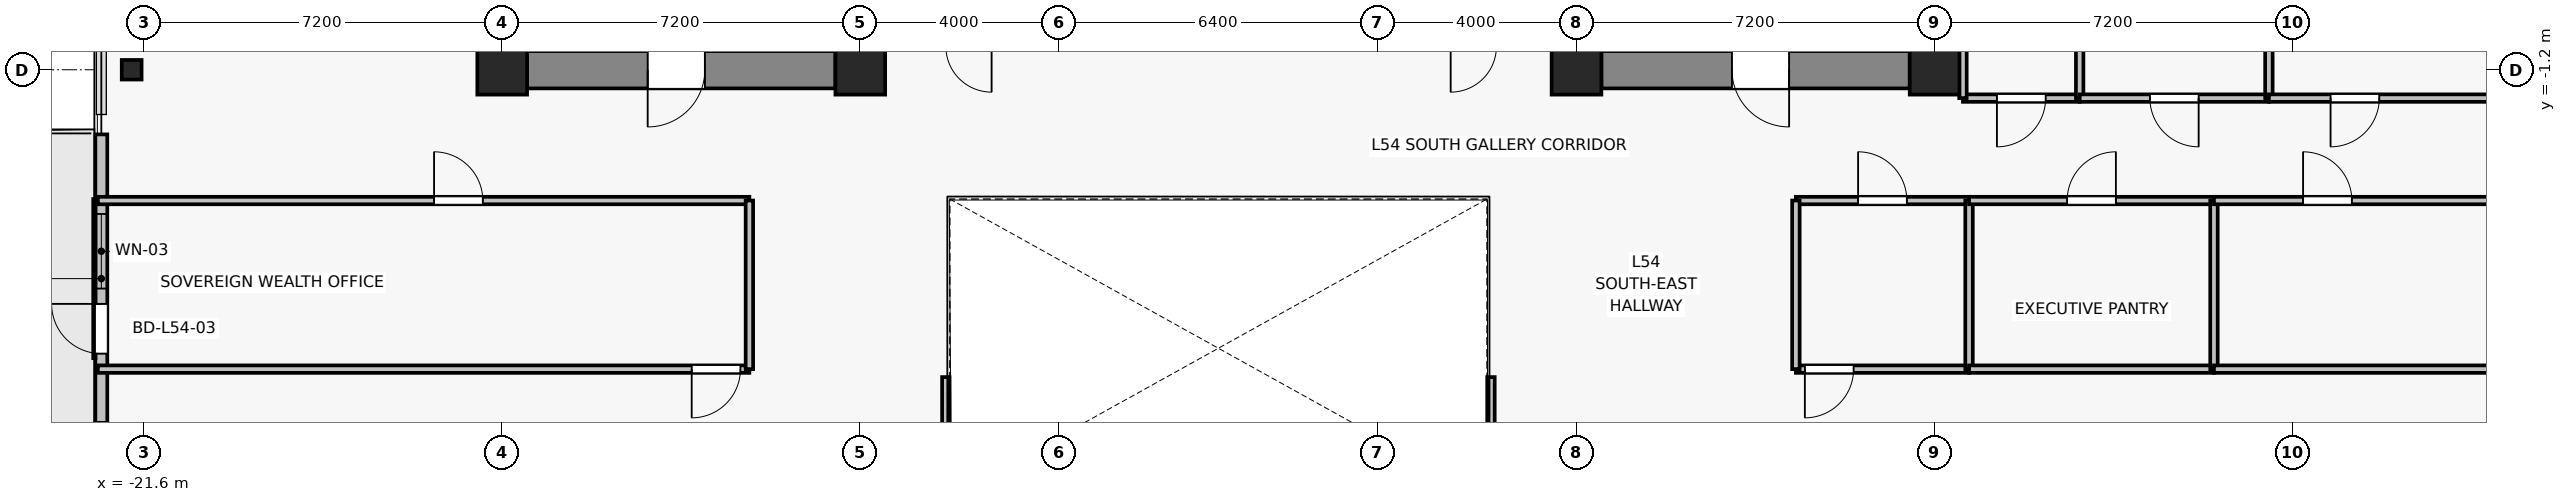
"""IFC4 building model, lengths in metres.
Left out: names, types, materials, properties, quantities, classifications, styles, units other than length and angle.
Written with IfcOpenShell. Run it as: python <this file> out.ifc"""

import sys

from ifc_helpers import new_model, si_unit, direction, frame, frame_2d, origin, origin_2d, place, context, subcontext, project, spatial, rectangle, i_section, extrude, source, transform, mapped, element, fill, save


model = new_model("IFC4")
c1 = context("Model", 3, precision=1e-05, world=origin(), true_north=direction((0.0, 1.0)))
c2 = subcontext(c1, "Body", "Model", "MODEL_VIEW")
j1 = project(units=[si_unit("LENGTHUNIT", "METRE"), si_unit("PLANEANGLEUNIT", "RADIAN")], contexts=[c1])
p1 = place(None, origin())
s1 = spatial("IfcSite", under=j1, at=p1, CompositionType="ELEMENT")
p2 = place(p1, origin())
s2 = spatial("IfcBuilding", under=s1, at=p2, CompositionType="ELEMENT")
p3 = place(p2, frame((0.0, 0.0, 192.4)))
s3 = spatial("IfcBuildingStorey", under=s2, at=p3, CompositionType="ELEMENT", Elevation=192.4)
for number, where, z_axis, x_axis in (
    (1, (-14.4, -1.2, 0.0), (0.0, 0.0, 1.0), (1.0, 0.0, 0.0)),
    (2, (-7.2, -1.2, 0.0), (0.0, 0.0, 1.0), (1.0, 0.0, 0.0)),
    (3, (7.2, -1.2, 0.0), (0.0, 0.0, 1.0), (1.0, 0.0, 0.0)),
    (4, (14.4, -1.2, 0.0), (0.0, 0.0, 1.0), (1.0, 0.0, 0.0)),
):
    element("IfcColumn", number, at=place(p3, frame(where, z_axis=z_axis, x_axis=x_axis)), inside=s3, PredefinedType="COLUMN", context=c2, shape_type="SweptSolid", body=[
        extrude(rectangle(XDim=1.0, YDim=1.0, at=origin_2d()), origin(), (0.0, 0.0, 1.0), 3.3),
    ])
p4 = place(p3, frame((-21.85, -1.2, 0.0), z_axis=(0.0, 0.0, 1.0), x_axis=(1.0, 0.0, 0.0)))
e5 = element("IfcColumn", 5, at=p4, inside=s3, PredefinedType="COLUMN", context=c2, shape_type="SweptSolid", body=[
    extrude(i_section(OverallWidth=0.399, OverallDepth=0.394, WebThickness=0.023, FlangeThickness=0.037, FilletRadius=0.015, at=origin_2d()), origin(), (0.0, 0.0, 1.0), 3.3),
])
p5 = place(p3, frame((-7.7, -1.2, 0.0), z_axis=(0.0, 0.0, 1.0), x_axis=(-1.0, 0.0, 0.0)))
e6 = element("IfcWall", 6, at=p5, inside=s3, PredefinedType="SHEAR", context=c2, shape_type="SweptSolid", body=[
    extrude(rectangle(XDim=6.2, YDim=0.75, at=frame_2d((3.1, 0.0))), origin(), (0.0, 0.0, 1.0), 3.075),
])
p6 = place(p5, frame((2.625, 0.0, 0.0)))
e7 = element("IfcOpeningElement", 7, at=p6, cuts=e6, PredefinedType="OPENING", context=c2, shape_type="SweptSolid", body=[
    extrude(rectangle(XDim=1.15, YDim=2.15, at=frame_2d((0.575, 1.075))), frame((0.0, 0.385, 0.0), z_axis=(0.0, -1.0, 0.0), x_axis=(1.0, 0.0, 0.0)), (0.0, 0.0, 1.0), 0.77),
])
p7 = place(p3, frame((13.9, -1.2, 0.0), z_axis=(0.0, 0.0, 1.0), x_axis=(-1.0, 0.0, 0.0)))
e8 = element("IfcWall", 8, at=p7, inside=s3, PredefinedType="SHEAR", context=c2, shape_type="SweptSolid", body=[
    extrude(rectangle(XDim=6.2, YDim=0.75, at=frame_2d((3.1, 0.0))), origin(), (0.0, 0.0, 1.0), 3.075),
])
p8 = place(p7, frame((2.425, 0.0, 0.0)))
e9 = element("IfcOpeningElement", 9, at=p8, cuts=e8, PredefinedType="OPENING", context=c2, shape_type="SweptSolid", body=[
    extrude(rectangle(XDim=1.15, YDim=2.15, at=frame_2d((0.575, 1.075))), frame((0.0, 0.385, 0.0), z_axis=(0.0, -1.0, 0.0), x_axis=(1.0, 0.0, 0.0)), (0.0, 0.0, 1.0), 0.77),
])
p9 = place(p3, frame((-22.46, -8.3, 0.0), z_axis=(0.0, 0.0, 1.0), x_axis=(0.0, 1.0, 0.0)))
e10 = element("IfcWall", 10, at=p9, inside=s3, PredefinedType="SOLIDWALL", context=c2, shape_type="SweptSolid", body=[
    extrude(rectangle(XDim=5.8, YDim=0.24, at=frame_2d((2.9, 0.0))), origin(), (0.0, 0.0, 1.0), 3.075),
])
p10 = place(p9, frame((1.392, 0.0, 0.0)))
e11 = element("IfcOpeningElement", 11, at=p10, cuts=e10, PredefinedType="OPENING", context=c2, shape_type="SweptSolid", body=[
    extrude(rectangle(XDim=1.0, YDim=2.2, at=frame_2d((0.5, 1.1))), frame((0.0, 0.13, 0.0), z_axis=(0.0, -1.0, 0.0), x_axis=(1.0, 0.0, 0.0)), (0.0, 0.0, 1.0), 0.26),
])
p11 = place(p9, frame((2.7, 0.0, 0.85)))
e12 = element("IfcOpeningElement", 12, at=p11, cuts=e10, PredefinedType="OPENING", context=c2, shape_type="SweptSolid", body=[
    extrude(rectangle(XDim=1.5, YDim=1.6, at=frame_2d((0.75, 0.8))), frame((0.0, 0.13, 0.0), z_axis=(0.0, -1.0, 0.0), x_axis=(1.0, 0.0, 0.0)), (0.0, 0.0, 1.0), 0.26),
])
p12 = place(p3, frame((-9.43, -7.22, 0.0), z_axis=(0.0, 0.0, 1.0), x_axis=(-1.0, 0.0, 0.0)))
e13 = element("IfcWall", 13, at=p12, inside=s3, PredefinedType="PARTITIONING", context=c2, shape_type="SweptSolid", body=[
    extrude(rectangle(XDim=13.1, YDim=0.15, at=frame_2d((6.55, 0.0))), origin(), (0.0, 0.0, 1.0), 2.565),
])
p13 = place(p12, frame((0.18, 0.0, 0.0)))
e14 = element("IfcOpeningElement", 14, at=p13, cuts=e13, PredefinedType="OPENING", context=c2, shape_type="SweptSolid", body=[
    extrude(rectangle(XDim=0.98, YDim=2.15, at=frame_2d((0.49, 1.075))), frame((0.0, 0.085, 0.0), z_axis=(0.0, -1.0, 0.0), x_axis=(1.0, 0.0, 0.0)), (0.0, 0.0, 1.0), 0.17),
])
p14 = place(p3, frame((-22.53, -3.83, 0.0), z_axis=(0.0, 0.0, 1.0), x_axis=(1.0, 0.0, 0.0)))
e15 = element("IfcWall", 15, at=p14, inside=s3, PredefinedType="PARTITIONING", context=c2, shape_type="SweptSolid", body=[
    extrude(rectangle(XDim=13.1, YDim=0.15, at=frame_2d((6.55, 0.0))), origin(), (0.0, 0.0, 1.0), 2.565),
])
p15 = place(p14, frame((6.76, 0.0, 0.0)))
e16 = element("IfcOpeningElement", 16, at=p15, cuts=e15, PredefinedType="OPENING", context=c2, shape_type="SweptSolid", body=[
    extrude(rectangle(XDim=0.98, YDim=2.15, at=frame_2d((0.49, 1.075))), frame((0.0, 0.085, 0.0), z_axis=(0.0, -1.0, 0.0), x_axis=(1.0, 0.0, 0.0)), (0.0, 0.0, 1.0), 0.17),
])
p16 = place(p3, frame((-9.43, -3.83, 0.0), z_axis=(0.0, 0.0, 1.0), x_axis=(0.0, -1.0, 0.0)))
e17 = element("IfcWall", 17, at=p16, inside=s3, PredefinedType="PARTITIONING", context=c2, shape_type="SweptSolid", body=[
    extrude(rectangle(XDim=3.39, YDim=0.15, at=frame_2d((1.695, 0.0))), origin(), (0.0, 0.0, 1.0), 2.665),
])
p17 = place(p3, frame((-5.48, -7.38, 0.0), z_axis=(0.0, 0.0, 1.0), x_axis=(0.0, -1.0, 0.0)))
e18 = element("IfcWall", 18, at=p17, inside=s3, PredefinedType="PARTITIONING", context=c2, shape_type="SweptSolid", body=[
    extrude(rectangle(XDim=9.95, YDim=0.15, at=frame_2d((4.975, 0.0))), origin(), (0.0, 0.0, 1.0), 2.565),
])
p18 = place(p3, frame((15.092, -7.22, 0.0), z_axis=(0.0, 0.0, 1.0), x_axis=(-1.0, 0.0, 0.0)))
e19 = element("IfcWall", 19, at=p18, inside=s3, PredefinedType="PARTITIONING", context=c2, shape_type="SweptSolid", body=[
    extrude(rectangle(XDim=3.481, YDim=0.15, at=frame_2d((1.74, 0.0))), origin(), (0.0, 0.0, 1.0), 2.565),
])
p19 = place(p18, frame((2.321, 0.0, 0.0)))
e20 = element("IfcOpeningElement", 20, at=p19, cuts=e19, PredefinedType="OPENING", context=c2, shape_type="SweptSolid", body=[
    extrude(rectangle(XDim=0.98, YDim=2.15, at=frame_2d((0.49, 1.075))), frame((0.0, 0.085, 0.0), z_axis=(0.0, -1.0, 0.0), x_axis=(1.0, 0.0, 0.0)), (0.0, 0.0, 1.0), 0.17),
])
p20 = place(p3, frame((11.611, -3.83, 0.0), z_axis=(0.0, 0.0, 1.0), x_axis=(1.0, 0.0, 0.0)))
e21 = element("IfcWall", 21, at=p20, inside=s3, PredefinedType="PARTITIONING", context=c2, shape_type="SweptSolid", body=[
    extrude(rectangle(XDim=3.481, YDim=0.15, at=frame_2d((1.74, 0.0))), origin(), (0.0, 0.0, 1.0), 2.565),
])
p21 = place(p20, frame((1.25, 0.0, 0.0)))
e22 = element("IfcOpeningElement", 22, at=p21, cuts=e21, PredefinedType="OPENING", context=c2, shape_type="SweptSolid", body=[
    extrude(rectangle(XDim=0.98, YDim=2.15, at=frame_2d((0.49, 1.075))), frame((0.0, 0.085, 0.0), z_axis=(0.0, -1.0, 0.0), x_axis=(1.0, 0.0, 0.0)), (0.0, 0.0, 1.0), 0.17),
])
p22 = place(p3, frame((11.611, -7.22, 0.0), z_axis=(0.0, 0.0, 1.0), x_axis=(0.0, 1.0, 0.0)))
e23 = element("IfcWall", 23, at=p22, inside=s3, PredefinedType="PARTITIONING", context=c2, shape_type="SweptSolid", body=[
    extrude(rectangle(XDim=3.39, YDim=0.15, at=frame_2d((1.695, 0.0))), origin(), (0.0, 0.0, 1.0), 2.665),
])
p23 = place(p3, frame((15.092, -3.83, 0.0), z_axis=(0.0, 0.0, 1.0), x_axis=(0.0, -1.0, 0.0)))
e24 = element("IfcWall", 24, at=p23, inside=s3, PredefinedType="PARTITIONING", context=c2, shape_type="SweptSolid", body=[
    extrude(rectangle(XDim=3.39, YDim=0.15, at=frame_2d((1.695, 0.0))), origin(), (0.0, 0.0, 1.0), 3.075),
])
p24 = place(p3, frame((20.017, -7.22, 0.0), z_axis=(0.0, 0.0, 1.0), x_axis=(-1.0, 0.0, 0.0)))
e25 = element("IfcWall", 25, at=p24, inside=s3, PredefinedType="PARTITIONING", context=c2, shape_type="SweptSolid", body=[
    extrude(rectangle(XDim=4.925, YDim=0.15, at=frame_2d((2.462, 0.0))), origin(), (0.0, 0.0, 1.0), 3.075),
])
p25 = place(p3, frame((15.092, -3.83, 0.0), z_axis=(0.0, 0.0, 1.0), x_axis=(1.0, 0.0, 0.0)))
e26 = element("IfcWall", 26, at=p25, inside=s3, PredefinedType="PARTITIONING", context=c2, shape_type="SweptSolid", body=[
    extrude(rectangle(XDim=4.925, YDim=0.15, at=frame_2d((2.462, 0.0))), origin(), (0.0, 0.0, 1.0), 3.075),
])
p26 = place(p25, frame((1.973, 0.0, 0.0)))
e27 = element("IfcOpeningElement", 27, at=p26, cuts=e26, PredefinedType="OPENING", context=c2, shape_type="SweptSolid", body=[
    extrude(rectangle(XDim=0.98, YDim=2.15, at=frame_2d((0.49, 1.075))), frame((0.0, 0.085, 0.0), z_axis=(0.0, -1.0, 0.0), x_axis=(1.0, 0.0, 0.0)), (0.0, 0.0, 1.0), 0.17),
])
p27 = place(p3, frame((20.017, -3.83, 0.0), z_axis=(0.0, 0.0, 1.0), x_axis=(0.0, -1.0, 0.0)))
e28 = element("IfcWall", 28, at=p27, inside=s3, PredefinedType="PARTITIONING", context=c2, shape_type="SweptSolid", body=[
    extrude(rectangle(XDim=3.39, YDim=0.15, at=frame_2d((1.695, 0.0))), origin(), (0.0, 0.0, 1.0), 3.075),
])
p28 = place(p3, frame((26.53, -7.22, 0.0), z_axis=(0.0, 0.0, 1.0), x_axis=(-1.0, 0.0, 0.0)))
e29 = element("IfcWall", 29, at=p28, inside=s3, PredefinedType="PARTITIONING", context=c2, shape_type="SweptSolid", body=[
    extrude(rectangle(XDim=6.513, YDim=0.15, at=frame_2d((3.256, 0.0))), origin(), (0.0, 0.0, 1.0), 2.565),
])
p29 = place(p3, frame((20.017, -3.83, 0.0), z_axis=(0.0, 0.0, 1.0), x_axis=(1.0, 0.0, 0.0)))
e30 = element("IfcWall", 30, at=p29, inside=s3, PredefinedType="PARTITIONING", context=c2, shape_type="SweptSolid", body=[
    extrude(rectangle(XDim=6.513, YDim=0.15, at=frame_2d((3.256, 0.0))), origin(), (0.0, 0.0, 1.0), 2.565),
])
p30 = place(p29, frame((1.792, 0.0, 0.0)))
e31 = element("IfcOpeningElement", 31, at=p30, cuts=e30, PredefinedType="OPENING", context=c2, shape_type="SweptSolid", body=[
    extrude(rectangle(XDim=0.98, YDim=2.15, at=frame_2d((0.49, 1.075))), frame((0.0, 0.085, 0.0), z_axis=(0.0, -1.0, 0.0), x_axis=(1.0, 0.0, 0.0)), (0.0, 0.0, 1.0), 0.17),
])
p31 = place(p3, frame((5.48, -17.33, 0.0), z_axis=(0.0, 0.0, 1.0), x_axis=(0.0, 1.0, 0.0)))
e32 = element("IfcWall", 32, at=p31, inside=s3, PredefinedType="PARTITIONING", context=c2, shape_type="SweptSolid", body=[
    extrude(rectangle(XDim=9.95, YDim=0.15, at=frame_2d((4.975, 0.0))), origin(), (0.0, 0.0, 1.0), 2.565),
])
p32 = place(p3, frame((17.317, -1.77, 0.0), z_axis=(0.0, 0.0, 1.0), x_axis=(-1.0, 0.0, 0.0)))
e33 = element("IfcWall", 33, at=p32, inside=s3, PredefinedType="PARTITIONING", context=c2, shape_type="SweptSolid", body=[
    extrude(rectangle(XDim=2.347, YDim=0.15, at=frame_2d((1.173, 0.0))), origin(), (0.0, 0.0, 1.0), 3.075),
])
p33 = place(p32, frame((0.684, 0.0, 0.0)))
e34 = element("IfcOpeningElement", 34, at=p33, cuts=e33, PredefinedType="OPENING", context=c2, shape_type="SweptSolid", body=[
    extrude(rectangle(XDim=0.98, YDim=2.15, at=frame_2d((0.49, 1.075))), frame((0.0, 0.085, 0.0), z_axis=(0.0, -1.0, 0.0), x_axis=(1.0, 0.0, 0.0)), (0.0, 0.0, 1.0), 0.17),
])
p34 = place(p3, frame((14.97, -1.77, 0.0), z_axis=(0.0, 0.0, 1.0), x_axis=(0.0, 1.0, 0.0)))
e35 = element("IfcWall", 35, at=p34, inside=s3, PredefinedType="PARTITIONING", context=c2, shape_type="SweptSolid", body=[
    extrude(rectangle(XDim=1.07, YDim=0.15, at=frame_2d((0.535, 0.0))), origin(), (0.0, 0.0, 1.0), 2.565),
])
p35 = place(p3, frame((17.317, 13.88, 0.0), z_axis=(0.0, 0.0, 1.0), x_axis=(0.0, -1.0, 0.0)))
e36 = element("IfcWall", 36, at=p35, inside=s3, PredefinedType="PARTITIONING", context=c2, shape_type="SweptSolid", body=[
    extrude(rectangle(XDim=15.65, YDim=0.15, at=frame_2d((7.825, 0.0))), origin(), (0.0, 0.0, 1.0), 2.565),
])
p36 = place(p3, frame((21.122, -1.77, 0.0), z_axis=(0.0, 0.0, 1.0), x_axis=(-1.0, 0.0, 0.0)))
e37 = element("IfcWall", 37, at=p36, inside=s3, PredefinedType="PARTITIONING", context=c2, shape_type="SweptSolid", body=[
    extrude(rectangle(XDim=3.805, YDim=0.15, at=frame_2d((1.902, 0.0))), origin(), (0.0, 0.0, 1.0), 3.075),
])
p37 = place(p36, frame((1.413, 0.0, 0.0)))
e38 = element("IfcOpeningElement", 38, at=p37, cuts=e37, PredefinedType="OPENING", context=c2, shape_type="SweptSolid", body=[
    extrude(rectangle(XDim=0.98, YDim=2.15, at=frame_2d((0.49, 1.075))), frame((0.0, 0.085, 0.0), z_axis=(0.0, -1.0, 0.0), x_axis=(1.0, 0.0, 0.0)), (0.0, 0.0, 1.0), 0.17),
])
p38 = place(p3, frame((21.122, 13.88, 0.0), z_axis=(0.0, 0.0, 1.0), x_axis=(0.0, -1.0, 0.0)))
e39 = element("IfcWall", 39, at=p38, inside=s3, PredefinedType="PARTITIONING", context=c2, shape_type="SweptSolid", body=[
    extrude(rectangle(XDim=15.65, YDim=0.15, at=frame_2d((7.825, 0.0))), origin(), (0.0, 0.0, 1.0), 2.565),
])
p39 = place(p3, frame((26.53, -1.77, 0.0), z_axis=(0.0, 0.0, 1.0), x_axis=(-1.0, 0.0, 0.0)))
e40 = element("IfcWall", 40, at=p39, inside=s3, PredefinedType="PARTITIONING", context=c2, shape_type="SweptSolid", body=[
    extrude(rectangle(XDim=5.408, YDim=0.15, at=frame_2d((2.704, 0.0))), origin(), (0.0, 0.0, 1.0), 2.565),
])
p40 = place(p39, frame((3.189, 0.0, 0.0)))
e41 = element("IfcOpeningElement", 41, at=p40, cuts=e40, PredefinedType="OPENING", context=c2, shape_type="SweptSolid", body=[
    extrude(rectangle(XDim=0.98, YDim=2.15, at=frame_2d((0.49, 1.075))), frame((0.0, 0.085, 0.0), z_axis=(0.0, -1.0, 0.0), x_axis=(1.0, 0.0, 0.0)), (0.0, 0.0, 1.0), 0.17),
])
m1 = source(origin(), c2, "Body", "SweptSolid", [
    extrude(rectangle(XDim=1.0, YDim=2.2, at=frame_2d((0.5, 1.1))), frame((0.0, 0.025, 0.0), z_axis=(0.0, -1.0, 0.0), x_axis=(1.0, 0.0, 0.0)), (0.0, 0.0, 1.0), 0.05),
])
p41 = place(p10, origin())
e42 = element("IfcDoor", 42, at=p41, inside=s3, OperationType="SINGLE_SWING_RIGHT", PredefinedType="DOOR", context=c2, shape_type="MappedRepresentation", body=[
    mapped(m1, transform((0.0, 0.0, 0.0), x_axis=(1.0, 0.0, 0.0), y_axis=(0.0, 1.0, 0.0), z_axis=(0.0, 0.0, 1.0), scale=1.0)),
])
fill(e11, e42)
m2 = source(origin(), c2, "Body", "SweptSolid", [
    extrude(rectangle(XDim=1.5, YDim=1.6, at=frame_2d((0.75, 0.8))), frame((0.0, 0.03, 0.0), z_axis=(0.0, -1.0, 0.0), x_axis=(1.0, 0.0, 0.0)), (0.0, 0.0, 1.0), 0.06),
])
p42 = place(p11, origin())
e43 = element("IfcWindow", 43, at=p42, inside=s3, PartitioningType="SINGLE_PANEL", PredefinedType="WINDOW", context=c2, shape_type="MappedRepresentation", body=[
    mapped(m2, transform((0.0, 0.0, 0.0), x_axis=(1.0, 0.0, 0.0), y_axis=(0.0, 1.0, 0.0), z_axis=(0.0, 0.0, 1.0), scale=1.0)),
])
fill(e12, e43)
m3 = source(origin(), c2, "Body", "SweptSolid", [
    extrude(rectangle(XDim=1.15, YDim=2.15, at=frame_2d((0.575, 1.075))), frame((0.0, 0.025, 0.0), z_axis=(0.0, -1.0, 0.0), x_axis=(1.0, 0.0, 0.0)), (0.0, 0.0, 1.0), 0.05),
])
p43 = place(p6, origin())
e44 = element("IfcDoor", 44, at=p43, inside=s3, OperationType="SINGLE_SWING_RIGHT", PredefinedType="DOOR", context=c2, shape_type="MappedRepresentation", body=[
    mapped(m3, transform((0.0, 0.0, 0.0), x_axis=(1.0, 0.0, 0.0), y_axis=(0.0, 1.0, 0.0), z_axis=(0.0, 0.0, 1.0), scale=1.0)),
])
fill(e7, e44)
p44 = place(p8, origin())
e45 = element("IfcDoor", 45, at=p44, inside=s3, OperationType="SINGLE_SWING_LEFT", PredefinedType="DOOR", context=c2, shape_type="MappedRepresentation", body=[
    mapped(m3, transform((0.0, 0.0, 0.0), x_axis=(1.0, 0.0, 0.0), y_axis=(0.0, 1.0, 0.0), z_axis=(0.0, 0.0, 1.0), scale=1.0)),
])
fill(e9, e45)
m4 = source(origin(), c2, "Body", "SweptSolid", [
    extrude(rectangle(XDim=0.98, YDim=2.15, at=frame_2d((0.49, 1.075))), frame((0.0, 0.025, 0.0), z_axis=(0.0, -1.0, 0.0), x_axis=(1.0, 0.0, 0.0)), (0.0, 0.0, 1.0), 0.05),
])
p45 = place(p15, origin())
e46 = element("IfcDoor", 46, at=p45, inside=s3, OperationType="SINGLE_SWING_LEFT", PredefinedType="DOOR", context=c2, shape_type="MappedRepresentation", body=[
    mapped(m4, transform((0.0, 0.0, 0.0), x_axis=(1.0, 0.0, 0.0), y_axis=(0.0, 1.0, 0.0), z_axis=(0.0, 0.0, 1.0), scale=1.0)),
])
fill(e16, e46)
p46 = place(p13, origin())
e47 = element("IfcDoor", 47, at=p46, inside=s3, OperationType="SINGLE_SWING_RIGHT", PredefinedType="DOOR", context=c2, shape_type="MappedRepresentation", body=[
    mapped(m4, transform((0.0, 0.0, 0.0), x_axis=(1.0, 0.0, 0.0), y_axis=(0.0, 1.0, 0.0), z_axis=(0.0, 0.0, 1.0), scale=1.0)),
])
fill(e14, e47)
p47 = place(p21, origin())
e48 = element("IfcDoor", 48, at=p47, inside=s3, OperationType="SINGLE_SWING_LEFT", PredefinedType="DOOR", context=c2, shape_type="MappedRepresentation", body=[
    mapped(m4, transform((0.0, 0.0, 0.0), x_axis=(1.0, 0.0, 0.0), y_axis=(0.0, 1.0, 0.0), z_axis=(0.0, 0.0, 1.0), scale=1.0)),
])
fill(e22, e48)
p48 = place(p26, origin())
e49 = element("IfcDoor", 49, at=p48, inside=s3, OperationType="SINGLE_SWING_RIGHT", PredefinedType="DOOR", context=c2, shape_type="MappedRepresentation", body=[
    mapped(m4, transform((0.0, 0.0, 0.0), x_axis=(1.0, 0.0, 0.0), y_axis=(0.0, 1.0, 0.0), z_axis=(0.0, 0.0, 1.0), scale=1.0)),
])
fill(e27, e49)
p49 = place(p30, origin())
e50 = element("IfcDoor", 50, at=p49, inside=s3, OperationType="SINGLE_SWING_LEFT", PredefinedType="DOOR", context=c2, shape_type="MappedRepresentation", body=[
    mapped(m4, transform((0.0, 0.0, 0.0), x_axis=(1.0, 0.0, 0.0), y_axis=(0.0, 1.0, 0.0), z_axis=(0.0, 0.0, 1.0), scale=1.0)),
])
fill(e31, e50)
p50 = place(p19, origin())
e51 = element("IfcDoor", 51, at=p50, inside=s3, OperationType="SINGLE_SWING_RIGHT", PredefinedType="DOOR", context=c2, shape_type="MappedRepresentation", body=[
    mapped(m4, transform((0.0, 0.0, 0.0), x_axis=(1.0, 0.0, 0.0), y_axis=(0.0, 1.0, 0.0), z_axis=(0.0, 0.0, 1.0), scale=1.0)),
])
fill(e20, e51)
p51 = place(p33, origin())
e52 = element("IfcDoor", 52, at=p51, inside=s3, OperationType="SINGLE_SWING_RIGHT", PredefinedType="DOOR", context=c2, shape_type="MappedRepresentation", body=[
    mapped(m4, transform((0.0, 0.0, 0.0), x_axis=(1.0, 0.0, 0.0), y_axis=(0.0, 1.0, 0.0), z_axis=(0.0, 0.0, 1.0), scale=1.0)),
])
fill(e34, e52)
p52 = place(p37, origin())
e53 = element("IfcDoor", 53, at=p52, inside=s3, OperationType="SINGLE_SWING_LEFT", PredefinedType="DOOR", context=c2, shape_type="MappedRepresentation", body=[
    mapped(m4, transform((0.0, 0.0, 0.0), x_axis=(1.0, 0.0, 0.0), y_axis=(0.0, 1.0, 0.0), z_axis=(0.0, 0.0, 1.0), scale=1.0)),
])
fill(e38, e53)
p53 = place(p40, origin())
e54 = element("IfcDoor", 54, at=p53, inside=s3, OperationType="SINGLE_SWING_RIGHT", PredefinedType="DOOR", context=c2, shape_type="MappedRepresentation", body=[
    mapped(m4, transform((0.0, 0.0, 0.0), x_axis=(1.0, 0.0, 0.0), y_axis=(0.0, 1.0, 0.0), z_axis=(0.0, 0.0, 1.0), scale=1.0)),
])
fill(e41, e54)
save(model, sys.argv[1])
